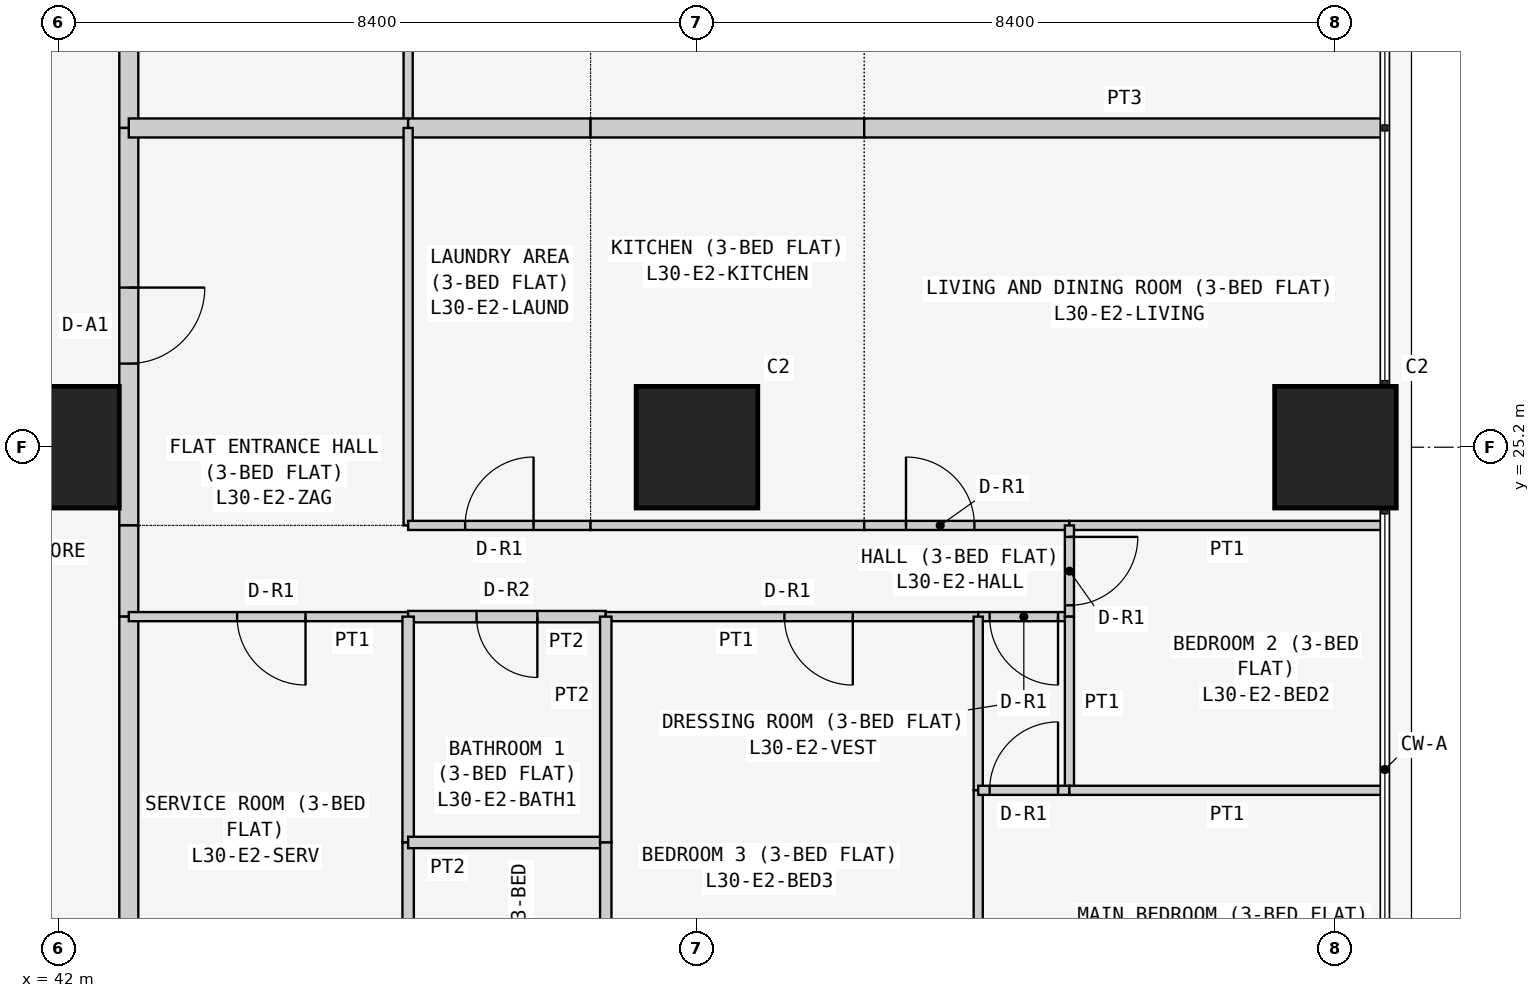
"""IFC4 building model, lengths in metres.
Left out: names, types, materials, properties, quantities, classifications, styles, units other than length and angle.
Written with IfcOpenShell. Run it as: python <this file> out.ifc"""

import sys

from ifc_helpers import new_model, si_unit, direction, frame, frame_2d, origin, origin_2d, place, context, subcontext, project, spatial, rectangle, extrude, element, fill, save


model = new_model("IFC4")
c1 = context("Model", 3, precision=1e-05, world=origin(), true_north=direction((0.0, 1.0)))
c2 = subcontext(c1, "Body", "Model", "MODEL_VIEW")
j1 = project(units=[si_unit("LENGTHUNIT", "METRE"), si_unit("PLANEANGLEUNIT", "RADIAN")], contexts=[c1])
p1 = place(None, origin())
s1 = spatial("IfcSite", under=j1, at=p1, CompositionType="ELEMENT")
p2 = place(p1, origin())
s2 = spatial("IfcBuilding", under=s1, at=p2, CompositionType="ELEMENT")
p3 = place(p2, frame((0.0, 0.0, 119.7)))
s3 = spatial("IfcBuildingStorey", under=s2, at=p3, CompositionType="ELEMENT", Elevation=119.7)
for number, where, z_axis, x_axis in (
    (1, (42.0, 25.2, 0.0), (0.0, 0.0, 1.0), (1.0, 0.0, 0.0)),
    (2, (50.4, 25.2, 0.0), (0.0, 0.0, 1.0), (1.0, 0.0, 0.0)),
    (3, (58.8, 25.2, 0.0), (0.0, 0.0, 1.0), (1.0, 0.0, 0.0)),
):
    element("IfcColumn", number, at=place(p3, frame(where, z_axis=z_axis, x_axis=x_axis)), inside=s3, PredefinedType="COLUMN", context=c2, shape_type="SweptSolid", body=[
        extrude(rectangle(XDim=1.6, YDim=1.6, at=origin_2d()), origin(), (0.0, 0.0, 1.0), 3.6),
    ])
p4 = place(p3, frame((42.925, 34.629, 0.0), z_axis=(0.0, 0.0, 1.0), x_axis=(0.0, -1.0, 0.0)))
e4 = element("IfcWall", 4, at=p4, inside=s3, PredefinedType="PARTITIONING", context=c2, shape_type="SweptSolid", body=[
    extrude(rectangle(XDim=5.229, YDim=0.25, at=frame_2d((2.615, 0.0))), origin(), (0.0, 0.0, 1.0), 3.45),
])
p5 = place(p4, frame((2.129, 0.0, 0.0)))
e5 = element("IfcOpeningElement", 5, at=p5, cuts=e4, PredefinedType="OPENING", context=c2, shape_type="SweptSolid", body=[
    extrude(rectangle(XDim=1.0, YDim=2.1, at=frame_2d((0.5, 1.05))), frame((0.0, 0.135, 0.0), z_axis=(0.0, -1.0, 0.0), x_axis=(1.0, 0.0, 0.0)), (0.0, 0.0, 1.0), 0.27),
])
p6 = place(p3, frame((42.925, 29.4, 0.0), z_axis=(0.0, 0.0, 1.0), x_axis=(0.0, -1.0, 0.0)))
e6 = element("IfcWall", 6, at=p6, inside=s3, PredefinedType="PARTITIONING", context=c2, shape_type="SweptSolid", body=[
    extrude(rectangle(XDim=5.229, YDim=0.25, at=frame_2d((2.615, 0.0))), origin(), (0.0, 0.0, 1.0), 3.45),
])
p7 = place(p6, frame((2.1, 0.0, 0.0)))
e7 = element("IfcOpeningElement", 7, at=p7, cuts=e6, PredefinedType="OPENING", context=c2, shape_type="SweptSolid", body=[
    extrude(rectangle(XDim=1.0, YDim=2.1, at=frame_2d((0.5, 1.05))), frame((0.0, 0.135, 0.0), z_axis=(0.0, -1.0, 0.0), x_axis=(1.0, 0.0, 0.0)), (0.0, 0.0, 1.0), 0.27),
])
p8 = place(p3, frame((42.925, 24.171, 0.0), z_axis=(0.0, 0.0, 1.0), x_axis=(0.0, -1.0, 0.0)))
e8 = element("IfcWall", 8, at=p8, inside=s3, PredefinedType="PARTITIONING", context=c2, shape_type="SweptSolid", body=[
    extrude(rectangle(XDim=1.2, YDim=0.25, at=frame_2d((0.6, 0.0))), origin(), (0.0, 0.0, 1.0), 3.45),
])
p9 = place(p3, frame((42.925, 22.971, 0.0), z_axis=(0.0, 0.0, 1.0), x_axis=(0.0, -1.0, 0.0)))
e9 = element("IfcWall", 9, at=p9, inside=s3, PredefinedType="PARTITIONING", context=c2, shape_type="SweptSolid", body=[
    extrude(rectangle(XDim=6.871, YDim=0.25, at=frame_2d((3.436, 0.0))), origin(), (0.0, 0.0, 1.0), 3.45),
])
p10 = place(p3, frame((46.6, 29.4, 0.0), z_axis=(0.0, 0.0, 1.0), x_axis=(0.0, 1.0, 0.0)))
e10 = element("IfcWall", 10, at=p10, inside=s3, PredefinedType="PARTITIONING", context=c2, shape_type="SweptSolid", body=[
    extrude(rectangle(XDim=5.229, YDim=0.12, at=frame_2d((2.615, 0.0))), origin(), (0.0, 0.0, 1.0), 3.45),
])
p11 = place(p3, frame((42.925, 29.4, 0.0), z_axis=(0.0, 0.0, 1.0), x_axis=(1.0, 0.0, 0.0)))
e11 = element("IfcWall", 11, at=p11, inside=s3, PredefinedType="PARTITIONING", context=c2, shape_type="SweptSolid", body=[
    extrude(rectangle(XDim=3.675, YDim=0.25, at=frame_2d((1.837, 0.0))), origin(), (0.0, 0.0, 1.0), 3.45),
])
p12 = place(p3, frame((46.6, 29.4, 0.0), z_axis=(0.0, 0.0, 1.0), x_axis=(1.0, 0.0, 0.0)))
e12 = element("IfcWall", 12, at=p12, inside=s3, PredefinedType="PARTITIONING", context=c2, shape_type="SweptSolid", body=[
    extrude(rectangle(XDim=2.4, YDim=0.25, at=frame_2d((1.2, 0.0))), origin(), (0.0, 0.0, 1.0), 3.45),
])
p13 = place(p3, frame((49.0, 29.4, 0.0), z_axis=(0.0, 0.0, 1.0), x_axis=(1.0, 0.0, 0.0)))
e13 = element("IfcWall", 13, at=p13, inside=s3, PredefinedType="PARTITIONING", context=c2, shape_type="SweptSolid", body=[
    extrude(rectangle(XDim=3.6, YDim=0.25, at=frame_2d((1.8, 0.0))), origin(), (0.0, 0.0, 1.0), 3.45),
])
p14 = place(p3, frame((52.6, 29.4, 0.0), z_axis=(0.0, 0.0, 1.0), x_axis=(1.0, 0.0, 0.0)))
e14 = element("IfcWall", 14, at=p14, inside=s3, PredefinedType="PARTITIONING", context=c2, shape_type="SweptSolid", body=[
    extrude(rectangle(XDim=6.85, YDim=0.25, at=frame_2d((3.425, 0.0))), origin(), (0.0, 0.0, 1.0), 3.45),
])
p15 = place(p3, frame((46.6, 29.4, 0.0), z_axis=(0.0, 0.0, 1.0), x_axis=(0.0, -1.0, 0.0)))
e15 = element("IfcWall", 15, at=p15, inside=s3, PredefinedType="PARTITIONING", context=c2, shape_type="SweptSolid", body=[
    extrude(rectangle(XDim=5.229, YDim=0.12, at=frame_2d((2.615, 0.0))), origin(), (0.0, 0.0, 1.0), 3.45),
])
p16 = place(p3, frame((49.0, 24.171, 0.0), z_axis=(0.0, 0.0, 1.0), x_axis=(-1.0, 0.0, 0.0)))
e16 = element("IfcWall", 16, at=p16, inside=s3, PredefinedType="PARTITIONING", context=c2, shape_type="SweptSolid", body=[
    extrude(rectangle(XDim=2.4, YDim=0.12, at=frame_2d((1.2, 0.0))), origin(), (0.0, 0.0, 1.0), 3.45),
])
p17 = place(p16, frame((0.75, 0.0, 0.0)))
e17 = element("IfcOpeningElement", 17, at=p17, cuts=e16, PredefinedType="OPENING", context=c2, shape_type="SweptSolid", body=[
    extrude(rectangle(XDim=0.9, YDim=2.1, at=frame_2d((0.45, 1.05))), frame((0.0, 0.07, 0.0), z_axis=(0.0, -1.0, 0.0), x_axis=(1.0, 0.0, 0.0)), (0.0, 0.0, 1.0), 0.14),
])
p18 = place(p3, frame((52.6, 24.171, 0.0), z_axis=(0.0, 0.0, 1.0), x_axis=(-1.0, 0.0, 0.0)))
e18 = element("IfcWall", 18, at=p18, inside=s3, PredefinedType="PARTITIONING", context=c2, shape_type="SweptSolid", body=[
    extrude(rectangle(XDim=3.6, YDim=0.12, at=frame_2d((1.8, 0.0))), origin(), (0.0, 0.0, 1.0), 3.45),
])
p19 = place(p3, frame((55.3, 24.171, 0.0), z_axis=(0.0, 0.0, 1.0), x_axis=(-1.0, 0.0, 0.0)))
e19 = element("IfcWall", 19, at=p19, inside=s3, PredefinedType="PARTITIONING", context=c2, shape_type="SweptSolid", body=[
    extrude(rectangle(XDim=2.7, YDim=0.12, at=frame_2d((1.35, 0.0))), origin(), (0.0, 0.0, 1.0), 3.45),
])
p20 = place(p19, frame((1.25, 0.0, 0.0)))
e20 = element("IfcOpeningElement", 20, at=p20, cuts=e19, PredefinedType="OPENING", context=c2, shape_type="SweptSolid", body=[
    extrude(rectangle(XDim=0.9, YDim=2.1, at=frame_2d((0.45, 1.05))), frame((0.0, 0.07, 0.0), z_axis=(0.0, -1.0, 0.0), x_axis=(1.0, 0.0, 0.0)), (0.0, 0.0, 1.0), 0.14),
])
p21 = place(p3, frame((59.45, 24.171, 0.0), z_axis=(0.0, 0.0, 1.0), x_axis=(-1.0, 0.0, 0.0)))
e21 = element("IfcWall", 21, at=p21, inside=s3, PredefinedType="PARTITIONING", context=c2, shape_type="SweptSolid", body=[
    extrude(rectangle(XDim=4.15, YDim=0.12, at=frame_2d((2.075, 0.0))), origin(), (0.0, 0.0, 1.0), 3.45),
])
p22 = place(p3, frame((46.6, 22.971, 0.0), z_axis=(0.0, 0.0, 1.0), x_axis=(-1.0, 0.0, 0.0)))
e22 = element("IfcWall", 22, at=p22, inside=s3, PredefinedType="PARTITIONING", context=c2, shape_type="SweptSolid", body=[
    extrude(rectangle(XDim=3.675, YDim=0.12, at=frame_2d((1.837, 0.0))), origin(), (0.0, 0.0, 1.0), 3.45),
])
p23 = place(p22, frame((1.35, 0.0, 0.0)))
e23 = element("IfcOpeningElement", 23, at=p23, cuts=e22, PredefinedType="OPENING", context=c2, shape_type="SweptSolid", body=[
    extrude(rectangle(XDim=0.9, YDim=2.1, at=frame_2d((0.45, 1.05))), frame((0.0, 0.07, 0.0), z_axis=(0.0, -1.0, 0.0), x_axis=(1.0, 0.0, 0.0)), (0.0, 0.0, 1.0), 0.14),
])
p24 = place(p3, frame((49.2, 22.971, 0.0), z_axis=(0.0, 0.0, 1.0), x_axis=(-1.0, 0.0, 0.0)))
e24 = element("IfcWall", 24, at=p24, inside=s3, PredefinedType="PARTITIONING", context=c2, shape_type="SweptSolid", body=[
    extrude(rectangle(XDim=2.6, YDim=0.15, at=frame_2d((1.3, 0.0))), origin(), (0.0, 0.0, 1.0), 3.45),
])
p25 = place(p24, frame((0.9, 0.0, 0.0)))
e25 = element("IfcOpeningElement", 25, at=p25, cuts=e24, PredefinedType="OPENING", context=c2, shape_type="SweptSolid", body=[
    extrude(rectangle(XDim=0.8, YDim=2.1, at=frame_2d((0.4, 1.05))), frame((0.0, 0.085, 0.0), z_axis=(0.0, -1.0, 0.0), x_axis=(1.0, 0.0, 0.0)), (0.0, 0.0, 1.0), 0.17),
])
p26 = place(p3, frame((54.1, 22.971, 0.0), z_axis=(0.0, 0.0, 1.0), x_axis=(-1.0, 0.0, 0.0)))
e26 = element("IfcWall", 26, at=p26, inside=s3, PredefinedType="PARTITIONING", context=c2, shape_type="SweptSolid", body=[
    extrude(rectangle(XDim=4.9, YDim=0.12, at=frame_2d((2.45, 0.0))), origin(), (0.0, 0.0, 1.0), 3.45),
])
p27 = place(p26, frame((1.65, 0.0, 0.0)))
e27 = element("IfcOpeningElement", 27, at=p27, cuts=e26, PredefinedType="OPENING", context=c2, shape_type="SweptSolid", body=[
    extrude(rectangle(XDim=0.9, YDim=2.1, at=frame_2d((0.45, 1.05))), frame((0.0, 0.07, 0.0), z_axis=(0.0, -1.0, 0.0), x_axis=(1.0, 0.0, 0.0)), (0.0, 0.0, 1.0), 0.14),
])
p28 = place(p3, frame((55.3, 22.971, 0.0), z_axis=(0.0, 0.0, 1.0), x_axis=(-1.0, 0.0, 0.0)))
e28 = element("IfcWall", 28, at=p28, inside=s3, PredefinedType="PARTITIONING", context=c2, shape_type="SweptSolid", body=[
    extrude(rectangle(XDim=1.2, YDim=0.12, at=frame_2d((0.6, 0.0))), origin(), (0.0, 0.0, 1.0), 3.45),
])
p29 = place(p28, frame((0.15, 0.0, 0.0)))
e29 = element("IfcOpeningElement", 29, at=p29, cuts=e28, PredefinedType="OPENING", context=c2, shape_type="SweptSolid", body=[
    extrude(rectangle(XDim=0.9, YDim=2.1, at=frame_2d((0.45, 1.05))), frame((0.0, 0.07, 0.0), z_axis=(0.0, -1.0, 0.0), x_axis=(1.0, 0.0, 0.0)), (0.0, 0.0, 1.0), 0.14),
])
p30 = place(p3, frame((55.3, 24.171, 0.0), z_axis=(0.0, 0.0, 1.0), x_axis=(0.0, -1.0, 0.0)))
e30 = element("IfcWall", 30, at=p30, inside=s3, PredefinedType="PARTITIONING", context=c2, shape_type="SweptSolid", body=[
    extrude(rectangle(XDim=1.2, YDim=0.12, at=frame_2d((0.6, 0.0))), origin(), (0.0, 0.0, 1.0), 3.45),
])
p31 = place(p30, frame((0.151, 0.0, 0.0)))
e31 = element("IfcOpeningElement", 31, at=p31, cuts=e30, PredefinedType="OPENING", context=c2, shape_type="SweptSolid", body=[
    extrude(rectangle(XDim=0.9, YDim=2.1, at=frame_2d((0.45, 1.05))), frame((0.0, 0.07, 0.0), z_axis=(0.0, -1.0, 0.0), x_axis=(1.0, 0.0, 0.0)), (0.0, 0.0, 1.0), 0.14),
])
p32 = place(p3, frame((46.6, 22.971, 0.0), z_axis=(0.0, 0.0, 1.0), x_axis=(0.0, -1.0, 0.0)))
e32 = element("IfcWall", 32, at=p32, inside=s3, PredefinedType="PARTITIONING", context=c2, shape_type="SweptSolid", body=[
    extrude(rectangle(XDim=2.971, YDim=0.15, at=frame_2d((1.485, 0.0))), origin(), (0.0, 0.0, 1.0), 3.45),
])
p33 = place(p3, frame((46.6, 20.0, 0.0), z_axis=(0.0, 0.0, 1.0), x_axis=(0.0, -1.0, 0.0)))
e33 = element("IfcWall", 33, at=p33, inside=s3, PredefinedType="PARTITIONING", context=c2, shape_type="SweptSolid", body=[
    extrude(rectangle(XDim=3.9, YDim=0.15, at=frame_2d((1.95, 0.0))), origin(), (0.0, 0.0, 1.0), 3.45),
])
p34 = place(p33, frame((1.45, 0.0, 0.0)))
e34 = element("IfcOpeningElement", 34, at=p34, cuts=e33, PredefinedType="OPENING", context=c2, shape_type="SweptSolid", body=[
    extrude(rectangle(XDim=0.8, YDim=2.1, at=frame_2d((0.4, 1.05))), frame((0.0, 0.085, 0.0), z_axis=(0.0, -1.0, 0.0), x_axis=(1.0, 0.0, 0.0)), (0.0, 0.0, 1.0), 0.17),
])
p35 = place(p3, frame((49.2, 20.0, 0.0), z_axis=(0.0, 0.0, 1.0), x_axis=(-1.0, 0.0, 0.0)))
e35 = element("IfcWall", 35, at=p35, inside=s3, PredefinedType="PARTITIONING", context=c2, shape_type="SweptSolid", body=[
    extrude(rectangle(XDim=2.6, YDim=0.15, at=frame_2d((1.3, 0.0))), origin(), (0.0, 0.0, 1.0), 3.45),
])
p36 = place(p3, frame((49.2, 22.971, 0.0), z_axis=(0.0, 0.0, 1.0), x_axis=(0.0, -1.0, 0.0)))
e36 = element("IfcWall", 36, at=p36, inside=s3, PredefinedType="PARTITIONING", context=c2, shape_type="SweptSolid", body=[
    extrude(rectangle(XDim=2.971, YDim=0.15, at=frame_2d((1.485, 0.0))), origin(), (0.0, 0.0, 1.0), 3.45),
])
p37 = place(p3, frame((49.2, 20.0, 0.0), z_axis=(0.0, 0.0, 1.0), x_axis=(0.0, -1.0, 0.0)))
e37 = element("IfcWall", 37, at=p37, inside=s3, PredefinedType="PARTITIONING", context=c2, shape_type="SweptSolid", body=[
    extrude(rectangle(XDim=3.9, YDim=0.15, at=frame_2d((1.95, 0.0))), origin(), (0.0, 0.0, 1.0), 3.45),
])
p38 = place(p3, frame((54.1, 22.971, 0.0), z_axis=(0.0, 0.0, 1.0), x_axis=(0.0, -1.0, 0.0)))
e38 = element("IfcWall", 38, at=p38, inside=s3, PredefinedType="PARTITIONING", context=c2, shape_type="SweptSolid", body=[
    extrude(rectangle(XDim=2.285, YDim=0.12, at=frame_2d((1.143, 0.0))), origin(), (0.0, 0.0, 1.0), 3.45),
])
p39 = place(p3, frame((54.1, 20.686, 0.0), z_axis=(0.0, 0.0, 1.0), x_axis=(0.0, -1.0, 0.0)))
e39 = element("IfcWall", 39, at=p39, inside=s3, PredefinedType="PARTITIONING", context=c2, shape_type="SweptSolid", body=[
    extrude(rectangle(XDim=4.586, YDim=0.12, at=frame_2d((2.293, 0.0))), origin(), (0.0, 0.0, 1.0), 3.45),
])
p40 = place(p3, frame((55.3, 22.971, 0.0), z_axis=(0.0, 0.0, 1.0), x_axis=(0.0, -1.0, 0.0)))
e40 = element("IfcWall", 40, at=p40, inside=s3, PredefinedType="PARTITIONING", context=c2, shape_type="SweptSolid", body=[
    extrude(rectangle(XDim=2.285, YDim=0.12, at=frame_2d((1.143, 0.0))), origin(), (0.0, 0.0, 1.0), 3.45),
])
p41 = place(p3, frame((55.3, 20.686, 0.0), z_axis=(0.0, 0.0, 1.0), x_axis=(-1.0, 0.0, 0.0)))
e41 = element("IfcWall", 41, at=p41, inside=s3, PredefinedType="PARTITIONING", context=c2, shape_type="SweptSolid", body=[
    extrude(rectangle(XDim=1.2, YDim=0.12, at=frame_2d((0.6, 0.0))), origin(), (0.0, 0.0, 1.0), 3.45),
])
p42 = place(p41, frame((0.15, 0.0, 0.0)))
e42 = element("IfcOpeningElement", 42, at=p42, cuts=e41, PredefinedType="OPENING", context=c2, shape_type="SweptSolid", body=[
    extrude(rectangle(XDim=0.9, YDim=2.1, at=frame_2d((0.45, 1.05))), frame((0.0, 0.07, 0.0), z_axis=(0.0, -1.0, 0.0), x_axis=(1.0, 0.0, 0.0)), (0.0, 0.0, 1.0), 0.14),
])
p43 = place(p3, frame((59.45, 20.686, 0.0), z_axis=(0.0, 0.0, 1.0), x_axis=(-1.0, 0.0, 0.0)))
e43 = element("IfcWall", 43, at=p43, inside=s3, PredefinedType="PARTITIONING", context=c2, shape_type="SweptSolid", body=[
    extrude(rectangle(XDim=4.15, YDim=0.12, at=frame_2d((2.075, 0.0))), origin(), (0.0, 0.0, 1.0), 3.45),
])
p44 = place(p7, origin())
e44 = element("IfcDoor", 44, at=p44, inside=s3, OperationType="SINGLE_SWING_LEFT", PredefinedType="DOOR", context=c2, shape_type="SweptSolid", body=[
    extrude(rectangle(XDim=1.0, YDim=2.1, at=frame_2d((0.5, 1.05))), frame((0.0, 0.025, 0.0), z_axis=(0.0, -1.0, 0.0), x_axis=(1.0, 0.0, 0.0)), (0.0, 0.0, 1.0), 0.05),
])
fill(e7, e44)
p45 = place(p17, frame((0.9, 0.0, 0.0), z_axis=(0.0, 0.0, 1.0), x_axis=(-1.0, 0.0, 0.0)))
e45 = element("IfcDoor", 45, at=p45, inside=s3, OperationType="SINGLE_SWING_RIGHT", PredefinedType="DOOR", context=c2, shape_type="SweptSolid", body=[
    extrude(rectangle(XDim=0.9, YDim=2.1, at=frame_2d((0.45, 1.05))), frame((0.0, 0.025, 0.0), z_axis=(0.0, -1.0, 0.0), x_axis=(1.0, 0.0, 0.0)), (0.0, 0.0, 1.0), 0.05),
])
fill(e17, e45)
p46 = place(p20, frame((0.9, 0.0, 0.0), z_axis=(0.0, 0.0, 1.0), x_axis=(-1.0, 0.0, 0.0)))
e46 = element("IfcDoor", 46, at=p46, inside=s3, OperationType="SINGLE_SWING_LEFT", PredefinedType="DOOR", context=c2, shape_type="SweptSolid", body=[
    extrude(rectangle(XDim=0.9, YDim=2.1, at=frame_2d((0.45, 1.05))), frame((0.0, 0.025, 0.0), z_axis=(0.0, -1.0, 0.0), x_axis=(1.0, 0.0, 0.0)), (0.0, 0.0, 1.0), 0.05),
])
fill(e20, e46)
p47 = place(p23, origin())
e47 = element("IfcDoor", 47, at=p47, inside=s3, OperationType="SINGLE_SWING_LEFT", PredefinedType="DOOR", context=c2, shape_type="SweptSolid", body=[
    extrude(rectangle(XDim=0.9, YDim=2.1, at=frame_2d((0.45, 1.05))), frame((0.0, 0.025, 0.0), z_axis=(0.0, -1.0, 0.0), x_axis=(1.0, 0.0, 0.0)), (0.0, 0.0, 1.0), 0.05),
])
fill(e23, e47)
p48 = place(p25, origin())
e48 = element("IfcDoor", 48, at=p48, inside=s3, OperationType="SINGLE_SWING_LEFT", PredefinedType="DOOR", context=c2, shape_type="SweptSolid", body=[
    extrude(rectangle(XDim=0.8, YDim=2.1, at=frame_2d((0.4, 1.05))), frame((0.0, 0.025, 0.0), z_axis=(0.0, -1.0, 0.0), x_axis=(1.0, 0.0, 0.0)), (0.0, 0.0, 1.0), 0.05),
])
fill(e25, e48)
p49 = place(p27, origin())
e49 = element("IfcDoor", 49, at=p49, inside=s3, OperationType="SINGLE_SWING_LEFT", PredefinedType="DOOR", context=c2, shape_type="SweptSolid", body=[
    extrude(rectangle(XDim=0.9, YDim=2.1, at=frame_2d((0.45, 1.05))), frame((0.0, 0.025, 0.0), z_axis=(0.0, -1.0, 0.0), x_axis=(1.0, 0.0, 0.0)), (0.0, 0.0, 1.0), 0.05),
])
fill(e27, e49)
p50 = place(p29, origin())
e50 = element("IfcDoor", 50, at=p50, inside=s3, OperationType="SINGLE_SWING_LEFT", PredefinedType="DOOR", context=c2, shape_type="SweptSolid", body=[
    extrude(rectangle(XDim=0.9, YDim=2.1, at=frame_2d((0.45, 1.05))), frame((0.0, 0.025, 0.0), z_axis=(0.0, -1.0, 0.0), x_axis=(1.0, 0.0, 0.0)), (0.0, 0.0, 1.0), 0.05),
])
fill(e29, e50)
p51 = place(p42, frame((0.9, 0.0, 0.0), z_axis=(0.0, 0.0, 1.0), x_axis=(-1.0, 0.0, 0.0)))
e51 = element("IfcDoor", 51, at=p51, inside=s3, OperationType="SINGLE_SWING_RIGHT", PredefinedType="DOOR", context=c2, shape_type="SweptSolid", body=[
    extrude(rectangle(XDim=0.9, YDim=2.1, at=frame_2d((0.45, 1.05))), frame((0.0, 0.025, 0.0), z_axis=(0.0, -1.0, 0.0), x_axis=(1.0, 0.0, 0.0)), (0.0, 0.0, 1.0), 0.05),
])
fill(e42, e51)
p52 = place(p31, origin())
e52 = element("IfcDoor", 52, at=p52, inside=s3, OperationType="SINGLE_SWING_LEFT", PredefinedType="DOOR", context=c2, shape_type="SweptSolid", body=[
    extrude(rectangle(XDim=0.9, YDim=2.1, at=frame_2d((0.45, 1.05))), frame((0.0, 0.025, 0.0), z_axis=(0.0, -1.0, 0.0), x_axis=(1.0, 0.0, 0.0)), (0.0, 0.0, 1.0), 0.05),
])
fill(e31, e52)
save(model, sys.argv[1])
